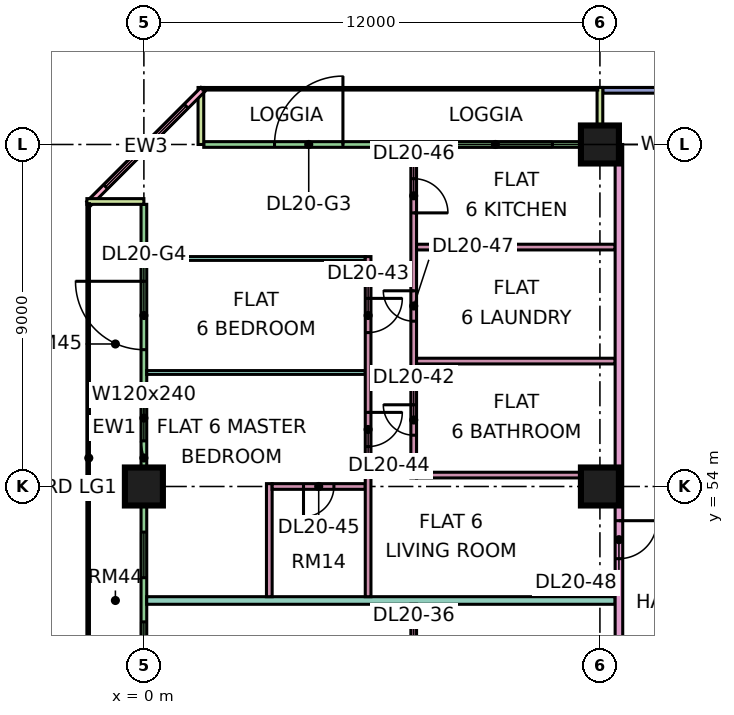
"""IFC4 building model, lengths in metres.
Left out: names, types, materials, properties, quantities, classifications, styles, units other than length and angle.
Written with IfcOpenShell. Run it as: python <this file> out.ifc"""

import sys

from ifc_helpers import new_model, si_unit, direction, frame, frame_2d, origin, origin_2d, place, context, subcontext, project, spatial, rectangle, extrude, element, fill, save


model = new_model("IFC4")
c1 = context("Model", 3, precision=1e-05, world=origin(), true_north=direction((0.0, 1.0)))
c2 = subcontext(c1, "Body", "Model", "MODEL_VIEW")
j1 = project(units=[si_unit("LENGTHUNIT", "METRE"), si_unit("PLANEANGLEUNIT", "RADIAN")], contexts=[c1])
p1 = place(None, origin())
s1 = spatial("IfcSite", under=j1, at=p1, CompositionType="ELEMENT")
p2 = place(p1, origin())
s2 = spatial("IfcBuilding", under=s1, at=p2, CompositionType="ELEMENT")
p3 = place(p2, frame((0.0, 0.0, 91.9)))
s3 = spatial("IfcBuildingStorey", under=s2, at=p3, CompositionType="ELEMENT", Elevation=91.9)
for number, where, z_axis, x_axis in (
    (1, (0.0, 54.0, 0.0), (0.0, 0.0, 1.0), (1.0, 0.0, 0.0)),
    (2, (12.0, 54.0, 0.0), (0.0, 0.0, 1.0), (1.0, 0.0, 0.0)),
    (3, (12.0, 63.0, 0.0), (0.0, 0.0, 1.0), (1.0, 0.0, 0.0)),
):
    element("IfcColumn", number, at=place(p3, frame(where, z_axis=z_axis, x_axis=x_axis)), inside=s3, PredefinedType="COLUMN", context=c2, shape_type="SweptSolid", body=[
        extrude(rectangle(XDim=1.0, YDim=1.0, at=origin_2d()), origin(), (0.0, 0.0, 1.0), 3.75),
    ])
p4 = place(p3, frame((22.5, 64.425, 0.0), z_axis=(0.0, 0.0, 1.0), x_axis=(-1.0, 0.0, 0.0)))
e4 = element("IfcWall", 4, at=p4, inside=s3, PredefinedType="SOLIDWALL", context=c2, shape_type="SweptSolid", body=[
    extrude(rectangle(XDim=10.425, YDim=0.15, at=frame_2d((5.212, 0.0))), origin(), (0.0, 0.0, 1.0), 3.35),
])
p5 = place(p4, frame((0.45, 0.0, 0.45)))
e5 = element("IfcOpeningElement", 5, at=p5, cuts=e4, PredefinedType="OPENING", context=c2, shape_type="SweptSolid", body=[
    extrude(rectangle(XDim=1.8, YDim=2.4, at=frame_2d((0.9, 1.2))), frame((0.0, 0.085, 0.0), z_axis=(0.0, -1.0, 0.0), x_axis=(1.0, 0.0, 0.0)), (0.0, 0.0, 1.0), 0.17),
])
p6 = place(p4, frame((3.3, 0.0, 0.45)))
e6 = element("IfcOpeningElement", 6, at=p6, cuts=e4, PredefinedType="OPENING", context=c2, shape_type="SweptSolid", body=[
    extrude(rectangle(XDim=3.0, YDim=2.4, at=frame_2d((1.5, 1.2))), frame((0.0, 0.085, 0.0), z_axis=(0.0, -1.0, 0.0), x_axis=(1.0, 0.0, 0.0)), (0.0, 0.0, 1.0), 0.17),
])
p7 = place(p3, frame((11.925, 63.0, 0.0), z_axis=(0.0, 0.0, 1.0), x_axis=(-1.0, 0.0, 0.0)))
e7 = element("IfcWall", 7, at=p7, inside=s3, PredefinedType="SOLIDWALL", context=c2, shape_type="SweptSolid", body=[
    extrude(rectangle(XDim=10.35, YDim=0.15, at=frame_2d((5.175, 0.0))), origin(), (0.0, 0.0, 1.0), 3.35),
])
p8 = place(p7, frame((1.175, 0.0, 0.45)))
e8 = element("IfcOpeningElement", 8, at=p8, cuts=e7, PredefinedType="OPENING", context=c2, shape_type="SweptSolid", body=[
    extrude(rectangle(XDim=3.0, YDim=2.4, at=frame_2d((1.5, 1.2))), frame((0.0, 0.085, 0.0), z_axis=(0.0, -1.0, 0.0), x_axis=(1.0, 0.0, 0.0)), (0.0, 0.0, 1.0), 0.17),
])
p9 = place(p7, frame((6.688, 0.0, 0.0)))
e9 = element("IfcOpeningElement", 9, at=p9, cuts=e7, PredefinedType="OPENING", context=c2, shape_type="SweptSolid", body=[
    extrude(rectangle(XDim=1.8, YDim=2.4, at=frame_2d((0.9, 1.2))), frame((0.0, 0.085, 0.0), z_axis=(0.0, -1.0, 0.0), x_axis=(1.0, 0.0, 0.0)), (0.0, 0.0, 1.0), 0.17),
])
for number, where, z_axis, x_axis in (
    (10, (12.0, 64.5, 0.0), (0.0, 0.0, 1.0), (0.0, -1.0, 0.0)),
    (11, (1.5, 64.5, 0.0), (0.0, 0.0, 1.0), (0.0, -1.0, 0.0)),
):
    element("IfcWall", number, at=place(p3, frame(where, z_axis=z_axis, x_axis=x_axis)), inside=s3, PredefinedType="SOLIDWALL", context=c2, shape_type="SweptSolid", body=[
        extrude(rectangle(XDim=1.5, YDim=0.15, at=frame_2d((0.75, 0.0))), origin(), (0.0, 0.0, 1.0), 3.35),
    ])
p10 = place(p3, frame((1.553, 64.447, 0.0), z_axis=(0.0, 0.0, 1.0), x_axis=(-0.707106781187, -0.707106781187, 0.0)))
e12 = element("IfcWall", 12, at=p10, inside=s3, PredefinedType="SOLIDWALL", context=c2, shape_type="SweptSolid", body=[
    extrude(rectangle(XDim=4.243, YDim=0.15, at=frame_2d((2.121, 0.0))), origin(), (0.0, 0.0, 1.0), 3.35),
])
p11 = place(p10, frame((0.621, 0.0, 0.45)))
e13 = element("IfcOpeningElement", 13, at=p11, cuts=e12, PredefinedType="OPENING", context=c2, shape_type="SweptSolid", body=[
    extrude(rectangle(XDim=3.0, YDim=2.4, at=frame_2d((1.5, 1.2))), frame((0.0, 0.085, 0.0), z_axis=(0.0, -1.0, 0.0), x_axis=(1.0, 0.0, 0.0)), (0.0, 0.0, 1.0), 0.17),
])
p12 = place(p3, frame((0.0, 61.425, 0.0), z_axis=(0.0, 0.0, 1.0), x_axis=(0.0, -1.0, 0.0)))
e14 = element("IfcWall", 14, at=p12, inside=s3, PredefinedType="SOLIDWALL", context=c2, shape_type="SweptSolid", body=[
    extrude(rectangle(XDim=13.35, YDim=0.15, at=frame_2d((6.675, 0.0))), origin(), (0.0, 0.0, 1.0), 3.35),
])
p13 = place(p12, frame((2.025, 0.0, 0.0)))
e15 = element("IfcOpeningElement", 15, at=p13, cuts=e14, PredefinedType="OPENING", context=c2, shape_type="SweptSolid", body=[
    extrude(rectangle(XDim=1.8, YDim=2.4, at=frame_2d((0.9, 1.2))), frame((0.0, 0.085, 0.0), z_axis=(0.0, -1.0, 0.0), x_axis=(1.0, 0.0, 0.0)), (0.0, 0.0, 1.0), 0.17),
])
p14 = place(p12, frame((5.025, 0.0, 0.45)))
e16 = element("IfcOpeningElement", 16, at=p14, cuts=e14, PredefinedType="OPENING", context=c2, shape_type="SweptSolid", body=[
    extrude(rectangle(XDim=1.2, YDim=2.4, at=frame_2d((0.6, 1.2))), frame((0.0, 0.085, 0.0), z_axis=(0.0, -1.0, 0.0), x_axis=(1.0, 0.0, 0.0)), (0.0, 0.0, 1.0), 0.17),
])
p15 = place(p12, frame((8.625, 0.0, 0.45)))
e17 = element("IfcOpeningElement", 17, at=p15, cuts=e14, PredefinedType="OPENING", context=c2, shape_type="SweptSolid", body=[
    extrude(rectangle(XDim=1.2, YDim=2.4, at=frame_2d((0.6, 1.2))), frame((0.0, 0.085, 0.0), z_axis=(0.0, -1.0, 0.0), x_axis=(1.0, 0.0, 0.0)), (0.0, 0.0, 1.0), 0.17),
])
p16 = place(p12, frame((10.988, 0.0, 0.45)))
e18 = element("IfcOpeningElement", 18, at=p16, cuts=e14, PredefinedType="OPENING", context=c2, shape_type="SweptSolid", body=[
    extrude(rectangle(XDim=1.8, YDim=2.4, at=frame_2d((0.9, 1.2))), frame((0.0, 0.085, 0.0), z_axis=(0.0, -1.0, 0.0), x_axis=(1.0, 0.0, 0.0)), (0.0, 0.0, 1.0), 0.17),
])
p17 = place(p3, frame((-1.5, 61.5, 0.0), z_axis=(0.0, 0.0, 1.0), x_axis=(1.0, 0.0, 0.0)))
e19 = element("IfcWall", 19, at=p17, inside=s3, PredefinedType="SOLIDWALL", context=c2, shape_type="SweptSolid", body=[
    extrude(rectangle(XDim=1.5, YDim=0.15, at=frame_2d((0.75, 0.0))), origin(), (0.0, 0.0, 1.0), 3.35),
])
p18 = place(p3, frame((0.074, 51.0, 0.0), z_axis=(0.0, 0.0, 1.0), x_axis=(1.0, 0.0, 0.0)))
e20 = element("IfcWall", 20, at=p18, inside=s3, PredefinedType="PARTITIONING", context=c2, shape_type="SweptSolid", body=[
    extrude(rectangle(XDim=12.326, YDim=0.2, at=frame_2d((6.163, 0.0))), origin(), (0.0, 0.0, 1.0), 3.35),
])
for number, where, z_axis, x_axis in (
    (21, (0.074, 57.0, 0.0), (0.0, 0.0, 1.0), (1.0, 0.0, 0.0)),
    (22, (0.074, 60.0, 0.0), (0.0, 0.0, 1.0), (1.0, 0.0, 0.0)),
):
    element("IfcWall", number, at=place(p3, frame(where, z_axis=z_axis, x_axis=x_axis)), inside=s3, PredefinedType="PARTITIONING", context=c2, shape_type="SweptSolid", body=[
        extrude(rectangle(XDim=5.751, YDim=0.1, at=frame_2d((2.875, 0.0))), origin(), (0.0, 0.0, 1.0), 3.35),
    ])
p19 = place(p3, frame((3.3, 51.1, 0.0), z_axis=(0.0, 0.0, 1.0), x_axis=(0.0, 1.0, 0.0)))
e23 = element("IfcWall", 23, at=p19, inside=s3, PredefinedType="PARTITIONING", context=c2, shape_type="SweptSolid", body=[
    extrude(rectangle(XDim=2.975, YDim=0.15, at=frame_2d((1.487, 0.0))), origin(), (0.0, 0.0, 1.0), 3.35),
])
p20 = place(p3, frame((3.375, 54.0, 0.0), z_axis=(0.0, 0.0, 1.0), x_axis=(1.0, 0.0, 0.0)))
e24 = element("IfcWall", 24, at=p20, inside=s3, PredefinedType="PARTITIONING", context=c2, shape_type="SweptSolid", body=[
    extrude(rectangle(XDim=2.45, YDim=0.15, at=frame_2d((1.225, 0.0))), origin(), (0.0, 0.0, 1.0), 3.35),
])
p21 = place(p20, frame((0.825, 0.0, 0.0)))
e25 = element("IfcOpeningElement", 25, at=p21, cuts=e24, PredefinedType="OPENING", context=c2, shape_type="SweptSolid", body=[
    extrude(rectangle(XDim=0.8, YDim=2.1, at=frame_2d((0.4, 1.05))), frame((0.0, 0.085, 0.0), z_axis=(0.0, -1.0, 0.0), x_axis=(1.0, 0.0, 0.0)), (0.0, 0.0, 1.0), 0.17),
])
p22 = place(p3, frame((5.9, 51.1, 0.0), z_axis=(0.0, 0.0, 1.0), x_axis=(0.0, 1.0, 0.0)))
e26 = element("IfcWall", 26, at=p22, inside=s3, PredefinedType="PARTITIONING", context=c2, shape_type="SweptSolid", body=[
    extrude(rectangle(XDim=8.95, YDim=0.15, at=frame_2d((4.475, 0.0))), origin(), (0.0, 0.0, 1.0), 3.35),
])
p23 = place(p22, frame((6.95, 0.0, 0.0)))
e27 = element("IfcOpeningElement", 27, at=p23, cuts=e26, PredefinedType="OPENING", context=c2, shape_type="SweptSolid", body=[
    extrude(rectangle(XDim=0.9, YDim=2.1, at=frame_2d((0.45, 1.05))), frame((0.0, 0.085, 0.0), z_axis=(0.0, -1.0, 0.0), x_axis=(1.0, 0.0, 0.0)), (0.0, 0.0, 1.0), 0.17),
])
p24 = place(p22, frame((3.95, 0.0, 0.0)))
e28 = element("IfcOpeningElement", 28, at=p24, cuts=e26, PredefinedType="OPENING", context=c2, shape_type="SweptSolid", body=[
    extrude(rectangle(XDim=0.9, YDim=2.1, at=frame_2d((0.45, 1.05))), frame((0.0, 0.085, 0.0), z_axis=(0.0, -1.0, 0.0), x_axis=(1.0, 0.0, 0.0)), (0.0, 0.0, 1.0), 0.17),
])
p25 = place(p3, frame((7.1, 41.925, 0.0), z_axis=(0.0, 0.0, 1.0), x_axis=(0.0, 1.0, 0.0)))
e29 = element("IfcWall", 29, at=p25, inside=s3, PredefinedType="PARTITIONING", context=c2, shape_type="SweptSolid", body=[
    extrude(rectangle(XDim=8.975, YDim=0.15, at=frame_2d((4.487, 0.0))), origin(), (0.0, 0.0, 1.0), 3.35),
])
p26 = place(p25, frame((7.125, 0.0, 0.0)))
e30 = element("IfcOpeningElement", 30, at=p26, cuts=e29, PredefinedType="OPENING", context=c2, shape_type="SweptSolid", body=[
    extrude(rectangle(XDim=0.9, YDim=2.1, at=frame_2d((0.45, 1.05))), frame((0.0, 0.085, 0.0), z_axis=(0.0, -1.0, 0.0), x_axis=(1.0, 0.0, 0.0)), (0.0, 0.0, 1.0), 0.17),
])
p27 = place(p25, frame((4.125, 0.0, 0.0)))
e31 = element("IfcOpeningElement", 31, at=p27, cuts=e29, PredefinedType="OPENING", context=c2, shape_type="SweptSolid", body=[
    extrude(rectangle(XDim=0.9, YDim=2.1, at=frame_2d((0.45, 1.05))), frame((0.0, 0.085, 0.0), z_axis=(0.0, -1.0, 0.0), x_axis=(1.0, 0.0, 0.0)), (0.0, 0.0, 1.0), 0.17),
])
p28 = place(p3, frame((7.1, 54.225, 0.0), z_axis=(0.0, 0.0, 1.0), x_axis=(0.0, 1.0, 0.0)))
e32 = element("IfcWall", 32, at=p28, inside=s3, PredefinedType="PARTITIONING", context=c2, shape_type="SweptSolid", body=[
    extrude(rectangle(XDim=8.701, YDim=0.15, at=frame_2d((4.351, 0.0))), origin(), (0.0, 0.0, 1.0), 3.35),
])
p29 = place(p28, frame((1.125, 0.0, 0.0)))
e33 = element("IfcOpeningElement", 33, at=p29, cuts=e32, PredefinedType="OPENING", context=c2, shape_type="SweptSolid", body=[
    extrude(rectangle(XDim=0.8, YDim=2.1, at=frame_2d((0.4, 1.05))), frame((0.0, 0.085, 0.0), z_axis=(0.0, -1.0, 0.0), x_axis=(1.0, 0.0, 0.0)), (0.0, 0.0, 1.0), 0.17),
])
p30 = place(p28, frame((6.975, 0.0, 0.0)))
e34 = element("IfcOpeningElement", 34, at=p30, cuts=e32, PredefinedType="OPENING", context=c2, shape_type="SweptSolid", body=[
    extrude(rectangle(XDim=0.9, YDim=2.1, at=frame_2d((0.45, 1.05))), frame((0.0, 0.085, 0.0), z_axis=(0.0, -1.0, 0.0), x_axis=(1.0, 0.0, 0.0)), (0.0, 0.0, 1.0), 0.17),
])
p31 = place(p28, frame((4.125, 0.0, 0.0)))
e35 = element("IfcOpeningElement", 35, at=p31, cuts=e32, PredefinedType="OPENING", context=c2, shape_type="SweptSolid", body=[
    extrude(rectangle(XDim=0.8, YDim=2.1, at=frame_2d((0.4, 1.05))), frame((0.0, 0.085, 0.0), z_axis=(0.0, -1.0, 0.0), x_axis=(1.0, 0.0, 0.0)), (0.0, 0.0, 1.0), 0.17),
])
for number, where, z_axis, x_axis in (
    (36, (7.175, 54.3, 0.0), (0.0, 0.0, 1.0), (1.0, 0.0, 0.0)),
    (37, (7.175, 57.3, 0.0), (0.0, 0.0, 1.0), (1.0, 0.0, 0.0)),
    (38, (7.175, 60.3, 0.0), (0.0, 0.0, 1.0), (1.0, 0.0, 0.0)),
):
    element("IfcWall", number, at=place(p3, frame(where, z_axis=z_axis, x_axis=x_axis)), inside=s3, PredefinedType="PARTITIONING", context=c2, shape_type="SweptSolid", body=[
        extrude(rectangle(XDim=5.225, YDim=0.15, at=frame_2d((2.612, 0.0))), origin(), (0.0, 0.0, 1.0), 3.35),
    ])
p32 = place(p3, frame((12.5, 20.0, 0.0), z_axis=(0.0, 0.0, 1.0), x_axis=(0.0, 1.0, 0.0)))
e39 = element("IfcWall", 39, at=p32, inside=s3, PredefinedType="PARTITIONING", context=c2, shape_type="SweptSolid", body=[
    extrude(rectangle(XDim=43.0, YDim=0.2, at=frame_2d((21.5, 0.0))), origin(), (0.0, 0.0, 1.0), 3.35),
])
p33 = place(p32, frame((28.65, 0.0, 0.0)))
e40 = element("IfcOpeningElement", 40, at=p33, cuts=e39, PredefinedType="OPENING", context=c2, shape_type="SweptSolid", body=[
    extrude(rectangle(XDim=1.0, YDim=2.1, at=frame_2d((0.5, 1.05))), frame((0.0, 0.11, 0.0), z_axis=(0.0, -1.0, 0.0), x_axis=(1.0, 0.0, 0.0)), (0.0, 0.0, 1.0), 0.22),
])
p34 = place(p32, frame((32.1, 0.0, 0.0)))
e41 = element("IfcOpeningElement", 41, at=p34, cuts=e39, PredefinedType="OPENING", context=c2, shape_type="SweptSolid", body=[
    extrude(rectangle(XDim=1.0, YDim=2.1, at=frame_2d((0.5, 1.05))), frame((0.0, 0.11, 0.0), z_axis=(0.0, -1.0, 0.0), x_axis=(1.0, 0.0, 0.0)), (0.0, 0.0, 1.0), 0.22),
])
p35 = place(p32, frame((0.6, 0.0, 0.0)))
e42 = element("IfcOpeningElement", 42, at=p35, cuts=e39, PredefinedType="OPENING", context=c2, shape_type="SweptSolid", body=[
    extrude(rectangle(XDim=1.2, YDim=2.1, at=frame_2d((0.6, 1.05))), frame((0.0, 0.11, 0.0), z_axis=(0.0, -1.0, 0.0), x_axis=(1.0, 0.0, 0.0)), (0.0, 0.0, 1.0), 0.22),
])
p36 = place(p32, frame((11.1, 0.0, 0.0)))
e43 = element("IfcOpeningElement", 43, at=p36, cuts=e39, PredefinedType="OPENING", context=c2, shape_type="SweptSolid", body=[
    extrude(rectangle(XDim=1.0, YDim=2.1, at=frame_2d((0.5, 1.05))), frame((0.0, 0.11, 0.0), z_axis=(0.0, -1.0, 0.0), x_axis=(1.0, 0.0, 0.0)), (0.0, 0.0, 1.0), 0.22),
])
p37 = place(p8, origin())
e44 = element("IfcWindow", 44, at=p37, inside=s3, PartitioningType="SINGLE_PANEL", PredefinedType="WINDOW", context=c2, shape_type="SweptSolid", body=[
    extrude(rectangle(XDim=3.0, YDim=2.4, at=frame_2d((1.5, 1.2))), frame((0.0, 0.03, 0.0), z_axis=(0.0, -1.0, 0.0), x_axis=(1.0, 0.0, 0.0)), (0.0, 0.0, 1.0), 0.06),
])
fill(e8, e44)
p38 = place(p9, frame((1.8, 0.0, 0.0), z_axis=(0.0, 0.0, 1.0), x_axis=(-1.0, 0.0, 0.0)))
e45 = element("IfcDoor", 45, at=p38, inside=s3, OperationType="DOUBLE_DOOR_SINGLE_SWING", PredefinedType="DOOR", context=c2, shape_type="SweptSolid", body=[
    extrude(rectangle(XDim=1.8, YDim=2.4, at=frame_2d((0.9, 1.2))), frame((0.0, 0.025, 0.0), z_axis=(0.0, -1.0, 0.0), x_axis=(1.0, 0.0, 0.0)), (0.0, 0.0, 1.0), 0.05),
])
fill(e9, e45)
p39 = place(p11, origin())
e46 = element("IfcWindow", 46, at=p39, inside=s3, PartitioningType="SINGLE_PANEL", PredefinedType="WINDOW", context=c2, shape_type="SweptSolid", body=[
    extrude(rectangle(XDim=3.0, YDim=2.4, at=frame_2d((1.5, 1.2))), frame((0.0, 0.03, 0.0), z_axis=(0.0, -1.0, 0.0), x_axis=(1.0, 0.0, 0.0)), (0.0, 0.0, 1.0), 0.06),
])
fill(e13, e46)
p40 = place(p13, frame((1.8, 0.0, 0.0), z_axis=(0.0, 0.0, 1.0), x_axis=(-1.0, 0.0, 0.0)))
e47 = element("IfcDoor", 47, at=p40, inside=s3, OperationType="DOUBLE_DOOR_SINGLE_SWING", PredefinedType="DOOR", context=c2, shape_type="SweptSolid", body=[
    extrude(rectangle(XDim=1.8, YDim=2.4, at=frame_2d((0.9, 1.2))), frame((0.0, 0.025, 0.0), z_axis=(0.0, -1.0, 0.0), x_axis=(1.0, 0.0, 0.0)), (0.0, 0.0, 1.0), 0.05),
])
fill(e15, e47)
p41 = place(p14, origin())
e48 = element("IfcWindow", 48, at=p41, inside=s3, PartitioningType="SINGLE_PANEL", PredefinedType="WINDOW", context=c2, shape_type="SweptSolid", body=[
    extrude(rectangle(XDim=1.2, YDim=2.4, at=frame_2d((0.6, 1.2))), frame((0.0, 0.03, 0.0), z_axis=(0.0, -1.0, 0.0), x_axis=(1.0, 0.0, 0.0)), (0.0, 0.0, 1.0), 0.06),
])
fill(e16, e48)
p42 = place(p15, origin())
e49 = element("IfcWindow", 49, at=p42, inside=s3, PartitioningType="SINGLE_PANEL", PredefinedType="WINDOW", context=c2, shape_type="SweptSolid", body=[
    extrude(rectangle(XDim=1.2, YDim=2.4, at=frame_2d((0.6, 1.2))), frame((0.0, 0.03, 0.0), z_axis=(0.0, -1.0, 0.0), x_axis=(1.0, 0.0, 0.0)), (0.0, 0.0, 1.0), 0.06),
])
fill(e17, e49)
p43 = place(p16, origin())
e50 = element("IfcWindow", 50, at=p43, inside=s3, PartitioningType="SINGLE_PANEL", PredefinedType="WINDOW", context=c2, shape_type="SweptSolid", body=[
    extrude(rectangle(XDim=1.8, YDim=2.4, at=frame_2d((0.9, 1.2))), frame((0.0, 0.03, 0.0), z_axis=(0.0, -1.0, 0.0), x_axis=(1.0, 0.0, 0.0)), (0.0, 0.0, 1.0), 0.06),
])
fill(e18, e50)
p44 = place(p29, frame((0.8, 0.0, 0.0), z_axis=(0.0, 0.0, 1.0), x_axis=(-1.0, 0.0, 0.0)))
e51 = element("IfcDoor", 51, at=p44, inside=s3, OperationType="SINGLE_SWING_RIGHT", PredefinedType="DOOR", context=c2, shape_type="SweptSolid", body=[
    extrude(rectangle(XDim=0.8, YDim=2.1, at=frame_2d((0.4, 1.05))), frame((0.0, 0.025, 0.0), z_axis=(0.0, -1.0, 0.0), x_axis=(1.0, 0.0, 0.0)), (0.0, 0.0, 1.0), 0.05),
])
fill(e33, e51)
p45 = place(p23, origin())
e52 = element("IfcDoor", 52, at=p45, inside=s3, OperationType="SINGLE_SWING_RIGHT", PredefinedType="DOOR", context=c2, shape_type="SweptSolid", body=[
    extrude(rectangle(XDim=0.9, YDim=2.1, at=frame_2d((0.45, 1.05))), frame((0.0, 0.025, 0.0), z_axis=(0.0, -1.0, 0.0), x_axis=(1.0, 0.0, 0.0)), (0.0, 0.0, 1.0), 0.05),
])
fill(e27, e52)
p46 = place(p24, origin())
e53 = element("IfcDoor", 53, at=p46, inside=s3, OperationType="SINGLE_SWING_RIGHT", PredefinedType="DOOR", context=c2, shape_type="SweptSolid", body=[
    extrude(rectangle(XDim=0.9, YDim=2.1, at=frame_2d((0.45, 1.05))), frame((0.0, 0.025, 0.0), z_axis=(0.0, -1.0, 0.0), x_axis=(1.0, 0.0, 0.0)), (0.0, 0.0, 1.0), 0.05),
])
fill(e28, e53)
p47 = place(p21, frame((0.8, 0.0, 0.0), z_axis=(0.0, 0.0, 1.0), x_axis=(-1.0, 0.0, 0.0)))
e54 = element("IfcDoor", 54, at=p47, inside=s3, OperationType="SINGLE_SWING_LEFT", PredefinedType="DOOR", context=c2, shape_type="SweptSolid", body=[
    extrude(rectangle(XDim=0.8, YDim=2.1, at=frame_2d((0.4, 1.05))), frame((0.0, 0.025, 0.0), z_axis=(0.0, -1.0, 0.0), x_axis=(1.0, 0.0, 0.0)), (0.0, 0.0, 1.0), 0.05),
])
fill(e25, e54)
p48 = place(p30, frame((0.9, 0.0, 0.0), z_axis=(0.0, 0.0, 1.0), x_axis=(-1.0, 0.0, 0.0)))
e55 = element("IfcDoor", 55, at=p48, inside=s3, OperationType="SINGLE_SWING_LEFT", PredefinedType="DOOR", context=c2, shape_type="SweptSolid", body=[
    extrude(rectangle(XDim=0.9, YDim=2.1, at=frame_2d((0.45, 1.05))), frame((0.0, 0.025, 0.0), z_axis=(0.0, -1.0, 0.0), x_axis=(1.0, 0.0, 0.0)), (0.0, 0.0, 1.0), 0.05),
])
fill(e34, e55)
p49 = place(p31, frame((0.8, 0.0, 0.0), z_axis=(0.0, 0.0, 1.0), x_axis=(-1.0, 0.0, 0.0)))
e56 = element("IfcDoor", 56, at=p49, inside=s3, OperationType="SINGLE_SWING_RIGHT", PredefinedType="DOOR", context=c2, shape_type="SweptSolid", body=[
    extrude(rectangle(XDim=0.8, YDim=2.1, at=frame_2d((0.4, 1.05))), frame((0.0, 0.025, 0.0), z_axis=(0.0, -1.0, 0.0), x_axis=(1.0, 0.0, 0.0)), (0.0, 0.0, 1.0), 0.05),
])
fill(e35, e56)
p50 = place(p34, origin())
e57 = element("IfcDoor", 57, at=p50, inside=s3, OperationType="SINGLE_SWING_RIGHT", PredefinedType="DOOR", context=c2, shape_type="SweptSolid", body=[
    extrude(rectangle(XDim=1.0, YDim=2.1, at=frame_2d((0.5, 1.05))), frame((0.0, 0.025, 0.0), z_axis=(0.0, -1.0, 0.0), x_axis=(1.0, 0.0, 0.0)), (0.0, 0.0, 1.0), 0.05),
])
fill(e41, e57)
save(model, sys.argv[1])
